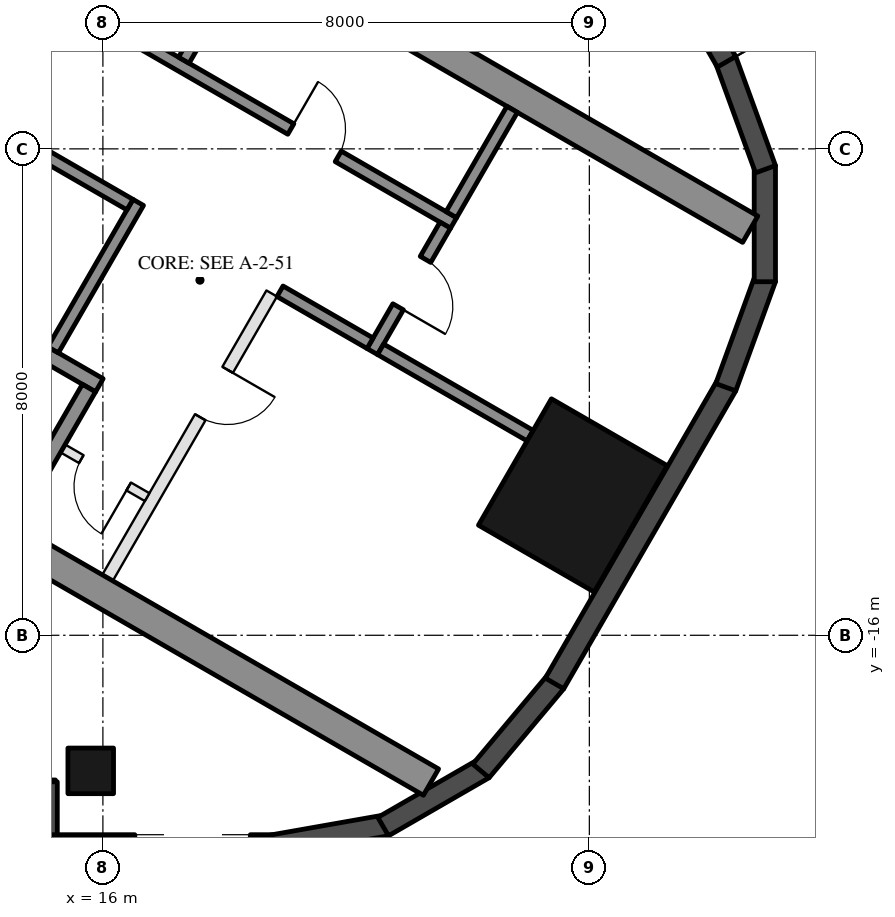
"""IFC4 building model, lengths in metres.
Left out: names, types, materials, properties, quantities, classifications, styles, units other than length and angle.
Written with IfcOpenShell. Run it as: python <this file> out.ifc"""

import sys

from ifc_helpers import new_model, si_unit, direction, frame, frame_2d, origin, origin_2d, place, context, subcontext, project, spatial, rectangle, hollow_rectangle, extrude, element, fill, save


model = new_model("IFC4")
c1 = context("Model", 3, precision=1e-05, world=origin(), true_north=direction((0.0, 1.0)))
c2 = subcontext(c1, "Body", "Model", "MODEL_VIEW")
j1 = project(units=[si_unit("LENGTHUNIT", "METRE"), si_unit("PLANEANGLEUNIT", "RADIAN")], contexts=[c1])
p1 = place(None, origin())
s1 = spatial("IfcSite", under=j1, at=p1, CompositionType="ELEMENT")
p2 = place(p1, origin())
s2 = spatial("IfcBuilding", under=s1, at=p2, CompositionType="ELEMENT")
p3 = place(p2, frame((0.0, 0.0, 220.6)))
s3 = spatial("IfcBuildingStorey", under=s2, at=p3, CompositionType="ELEMENT", Elevation=220.6)
p4 = place(p3, frame((15.8, -18.23, 0.0), z_axis=(0.0, 0.0, 1.0), x_axis=(-1.0, 0.0, 0.0)))
e1 = element("IfcColumn", 1, at=p4, inside=s3, PredefinedType="COLUMN", context=c2, shape_type="SweptSolid", body=[
    extrude(hollow_rectangle(XDim=0.75, YDim=0.75, WallThickness=0.035, at=origin_2d()), origin(), (0.0, 0.0, 1.0), 3.7),
])
p5 = place(p3, frame((23.729, -13.7, 0.0), z_axis=(0.0, 0.0, 1.0), x_axis=(0.5, 0.866025403784, 0.0)))
e2 = element("IfcColumn", 2, at=p5, inside=s3, PredefinedType="COLUMN", context=c2, shape_type="SweptSolid", body=[
    extrude(hollow_rectangle(XDim=2.4, YDim=2.2, WallThickness=0.06, at=origin_2d()), origin(), (0.0, 0.0, 1.0), 3.7),
])
p6 = place(p3, frame((8.48, -18.555, 0.0), z_axis=(0.0, 0.0, 1.0), x_axis=(1.0, 0.0, 0.0)))
e3 = element("IfcWall", 3, at=p6, inside=s3, PredefinedType="SOLIDWALL", context=c2, shape_type="SweptSolid", body=[
    extrude(rectangle(XDim=6.74, YDim=0.35, at=frame_2d((3.37, 0.0))), origin(), (0.0, 0.0, 1.0), 3.55),
])
p7 = place(p6, frame((0.32, 0.0, 0.0)))
e4 = element("IfcOpeningElement", 4, at=p7, cuts=e3, PredefinedType="OPENING", context=c2, shape_type="SweptSolid", body=[
    extrude(rectangle(XDim=2.4, YDim=2.4, at=frame_2d((1.2, 1.2))), frame((0.0, 0.185, 0.0), z_axis=(0.0, -1.0, 0.0), x_axis=(1.0, 0.0, 0.0)), (0.0, 0.0, 1.0), 0.37),
])
p8 = place(p6, frame((3.02, 0.0, 0.3)))
e5 = element("IfcOpeningElement", 5, at=p8, cuts=e3, PredefinedType="OPENING", context=c2, shape_type="SweptSolid", body=[
    extrude(rectangle(XDim=2.9, YDim=2.65, at=frame_2d((1.45, 1.325))), frame((0.0, 0.185, 0.0), z_axis=(0.0, -1.0, 0.0), x_axis=(1.0, 0.0, 0.0)), (0.0, 0.0, 1.0), 0.37),
])
p9 = place(p3, frame((15.075, -18.41, 0.0), z_axis=(0.0, 0.0, 1.0), x_axis=(0.0, -1.0, 0.0)))
e6 = element("IfcWall", 6, at=p9, inside=s3, PredefinedType="SOLIDWALL", context=c2, shape_type="SweptSolid", body=[
    extrude(rectangle(XDim=1.22, YDim=0.35, at=frame_2d((0.61, 0.0))), origin(), (0.0, 0.0, 1.0), 3.55),
])
p10 = place(p3, frame((14.9, -19.455, 0.0), z_axis=(0.0, 0.0, 1.0), x_axis=(1.0, 0.0, 0.0)))
e7 = element("IfcWall", 7, at=p10, inside=s3, PredefinedType="SOLIDWALL", context=c2, shape_type="SweptSolid", body=[
    extrude(rectangle(XDim=3.916, YDim=0.35, at=frame_2d((1.958, 0.0))), origin(), (0.0, 0.0, 1.0), 3.55),
])
p11 = place(p10, frame((1.625, 0.0, 0.3)))
e8 = element("IfcOpeningElement", 8, at=p11, cuts=e7, PredefinedType="OPENING", context=c2, shape_type="SweptSolid", body=[
    extrude(rectangle(XDim=1.9, YDim=2.65, at=frame_2d((0.95, 1.325))), frame((0.0, 0.185, 0.0), z_axis=(0.0, -1.0, 0.0), x_axis=(1.0, 0.0, 0.0)), (0.0, 0.0, 1.0), 0.37),
])
p12 = place(p3, frame((18.785, -19.458, 0.0), z_axis=(0.0, 0.0, 1.0), x_axis=(0.984798995425, 0.173697837091, 0.0)))
e9 = element("IfcWall", 9, at=p12, inside=s3, PredefinedType="SOLIDWALL", context=c2, shape_type="SweptSolid", body=[
    extrude(rectangle(XDim=1.91, YDim=0.35, at=frame_2d((0.955, 0.0))), origin(), (0.0, 0.0, 1.0), 3.55),
])
for number, where, z_axis, x_axis in (
    (10, (20.61, -19.147, 0.0), (0.0, 0.0, 1.0), (0.866, 0.5, 0.0)),
    (11, (22.217, -18.231, 0.0), (0.0, 0.0, 1.0), (0.643, 0.766, 0.0)),
):
    element("IfcWall", number, at=place(p3, frame(where, z_axis=z_axis, x_axis=x_axis)), inside=s3, PredefinedType="SOLIDWALL", context=c2, shape_type="SweptSolid", body=[
        extrude(rectangle(XDim=1.91, YDim=0.35, at=frame_2d((0.955, 0.0))), origin(), (0.0, 0.0, 1.0), 3.55),
    ])
p13 = place(p3, frame((23.427, -16.792, 0.0), z_axis=(0.0, 0.0, 1.0), x_axis=(0.500018773155, 0.866014564827, 0.0)))
e12 = element("IfcWall", 12, at=p13, inside=s3, PredefinedType="SOLIDWALL", context=c2, shape_type="SweptSolid", body=[
    extrude(rectangle(XDim=5.658, YDim=0.35, at=frame_2d((2.829, 0.0))), origin(), (0.0, 0.0, 1.0), 3.55),
])
for number, where, z_axis, x_axis in (
    (13, (26.244, -11.92, 0.0), (0.0, 0.0, 1.0), (0.342, 0.94, 0.0)),
    (14, (26.886, -10.185, 0.0), (0.0, 0.0, 1.0), (0.0, 1.0, 0.0)),
    (15, (26.897, -8.335, 0.0), (0.0, 0.0, 1.0), (-0.342, 0.94, 0.0)),
):
    element("IfcWall", number, at=place(p3, frame(where, z_axis=z_axis, x_axis=x_axis)), inside=s3, PredefinedType="SOLIDWALL", context=c2, shape_type="SweptSolid", body=[
        extrude(rectangle(XDim=1.91, YDim=0.35, at=frame_2d((0.955, 0.0))), origin(), (0.0, 0.0, 1.0), 3.55),
    ])
p14 = place(p3, frame((26.257, -6.567, 0.0), z_axis=(0.0, 0.0, 1.0), x_axis=(-0.500023526245, 0.866011820475, 0.0)))
e16 = element("IfcWall", 16, at=p14, inside=s3, PredefinedType="SOLIDWALL", context=c2, shape_type="SweptSolid", body=[
    extrude(rectangle(XDim=11.816, YDim=0.35, at=frame_2d((5.908, 0.0))), origin(), (0.0, 0.0, 1.0), 3.55),
])
p15 = place(p14, frame((0.38, 0.0, 0.3)))
e17 = element("IfcOpeningElement", 17, at=p15, cuts=e16, PredefinedType="OPENING", context=c2, shape_type="SweptSolid", body=[
    extrude(rectangle(XDim=1.9, YDim=2.65, at=frame_2d((0.95, 1.325))), frame((0.0, 0.185, 0.0), z_axis=(0.0, -1.0, 0.0), x_axis=(1.0, 0.0, 0.0)), (0.0, 0.0, 1.0), 0.37),
])
p16 = place(p14, frame((7.791, 0.0, 0.0)))
e18 = element("IfcOpeningElement", 18, at=p16, cuts=e16, PredefinedType="OPENING", context=c2, shape_type="SweptSolid", body=[
    extrude(rectangle(XDim=2.4, YDim=2.4, at=frame_2d((1.2, 1.2))), frame((0.0, 0.185, 0.0), z_axis=(0.0, -1.0, 0.0), x_axis=(1.0, 0.0, 0.0)), (0.0, 0.0, 1.0), 0.37),
])
p17 = place(p14, frame((3.741, 0.0, 0.3)))
e19 = element("IfcOpeningElement", 19, at=p17, cuts=e16, PredefinedType="OPENING", context=c2, shape_type="SweptSolid", body=[
    extrude(rectangle(XDim=1.7, YDim=2.65, at=frame_2d((0.85, 1.325))), frame((0.0, 0.185, 0.0), z_axis=(0.0, -1.0, 0.0), x_axis=(1.0, 0.0, 0.0)), (0.0, 0.0, 1.0), 0.37),
])
p18 = place(p14, frame((5.741, 0.0, 0.3)))
e20 = element("IfcOpeningElement", 20, at=p18, cuts=e16, PredefinedType="OPENING", context=c2, shape_type="SweptSolid", body=[
    extrude(rectangle(XDim=1.7, YDim=2.65, at=frame_2d((0.85, 1.325))), frame((0.0, 0.185, 0.0), z_axis=(0.0, -1.0, 0.0), x_axis=(1.0, 0.0, 0.0)), (0.0, 0.0, 1.0), 0.37),
])
for number, where, z_axis, x_axis in (
    (21, (8.547, -10.997, 0.0), (0.0, 0.0, 1.0), (0.866, -0.5, 0.0)),
    (22, (13.797, -1.903, 0.0), (0.0, 0.0, 1.0), (0.866, -0.5, 0.0)),
):
    element("IfcWall", number, at=place(p3, frame(where, z_axis=z_axis, x_axis=x_axis)), inside=s3, PredefinedType="SHEAR", context=c2, shape_type="SweptSolid", body=[
        extrude(rectangle(XDim=14.837, YDim=0.5, at=frame_2d((7.418, 0.0))), origin(), (0.0, 0.0, 1.0), 3.5),
    ])
p19 = place(p3, frame((10.356, -8.664, 0.0), z_axis=(0.0, 0.0, 1.0), x_axis=(0.866028629588, -0.499994412703, 0.0)))
e23 = element("IfcWall", 23, at=p19, inside=s3, PredefinedType="SHEAR", context=c2, shape_type="SweptSolid", body=[
    extrude(rectangle(XDim=6.45, YDim=0.25, at=frame_2d((3.225, 0.0))), origin(), (0.0, 0.0, 1.0), 3.5),
])
p20 = place(p19, frame((0.3, 0.0, 0.0)))
e24 = element("IfcOpeningElement", 24, at=p20, cuts=e23, PredefinedType="OPENING", context=c2, shape_type="SweptSolid", body=[
    extrude(rectangle(XDim=1.0, YDim=2.1, at=frame_2d((0.5, 1.05))), frame((0.0, 0.135, 0.0), z_axis=(0.0, -1.0, 0.0), x_axis=(1.0, 0.0, 0.0)), (0.0, 0.0, 1.0), 0.27),
])
p21 = place(p3, frame((14.496, -14.143, 0.0), z_axis=(0.0, 0.0, 1.0), x_axis=(0.500062241894, 0.865989465428, 0.0)))
e25 = element("IfcWall", 25, at=p21, inside=s3, PredefinedType="SHEAR", context=c2, shape_type="SweptSolid", body=[
    extrude(rectangle(XDim=2.55, YDim=0.25, at=frame_2d((1.275, 0.0))), origin(), (0.0, 0.0, 1.0), 3.5),
])
p22 = place(p3, frame((15.181, -11.305, 0.0), z_axis=(0.0, 0.0, 1.0), x_axis=(0.49994636267, 0.866056369097, 0.0)))
e26 = element("IfcWall", 26, at=p22, inside=s3, PredefinedType="SHEAR", context=c2, shape_type="SweptSolid", body=[
    extrude(rectangle(XDim=2.8, YDim=0.2, at=frame_2d((1.4, 0.0))), origin(), (0.0, 0.0, 1.0), 3.5),
])
p23 = place(p3, frame((14.02, -7.517, 0.0), z_axis=(0.0, 0.0, 1.0), x_axis=(0.866034573852, -0.49998411664, 0.0)))
e27 = element("IfcWall", 27, at=p23, inside=s3, PredefinedType="SHEAR", context=c2, shape_type="SweptSolid", body=[
    extrude(rectangle(XDim=2.8, YDim=0.2, at=frame_2d((1.4, 0.0))), origin(), (0.0, 0.0, 1.0), 3.5),
])
p24 = place(p3, frame((12.968, -4.138, 0.0), z_axis=(0.0, 0.0, 1.0), x_axis=(0.866028328073, -0.49999493495, 0.0)))
e28 = element("IfcWall", 28, at=p24, inside=s3, PredefinedType="SHEAR", context=c2, shape_type="SweptSolid", body=[
    extrude(rectangle(XDim=10.16, YDim=0.2, at=frame_2d((5.08, 0.0))), origin(), (0.0, 0.0, 1.0), 3.5),
])
p25 = place(p24, frame((1.99, 0.0, 0.0)))
e29 = element("IfcOpeningElement", 29, at=p25, cuts=e28, PredefinedType="OPENING", context=c2, shape_type="SweptSolid", body=[
    extrude(rectangle(XDim=0.9, YDim=2.1, at=frame_2d((0.45, 1.05))), frame((0.0, 0.11, 0.0), z_axis=(0.0, -1.0, 0.0), x_axis=(1.0, 0.0, 0.0)), (0.0, 0.0, 1.0), 0.22),
])
p26 = place(p24, frame((7.07, 0.0, 0.0)))
e30 = element("IfcOpeningElement", 30, at=p26, cuts=e28, PredefinedType="OPENING", context=c2, shape_type="SweptSolid", body=[
    extrude(rectangle(XDim=0.9, YDim=2.1, at=frame_2d((0.45, 1.05))), frame((0.0, 0.11, 0.0), z_axis=(0.0, -1.0, 0.0), x_axis=(1.0, 0.0, 0.0)), (0.0, 0.0, 1.0), 0.22),
])
p27 = place(p3, frame((20.43, -11.333, 0.0), z_axis=(0.0, 0.0, 1.0), x_axis=(0.500001309137, 0.866024647952, 0.0)))
e31 = element("IfcWall", 31, at=p27, inside=s3, PredefinedType="SHEAR", context=c2, shape_type="SweptSolid", body=[
    extrude(rectangle(XDim=2.4, YDim=0.2, at=frame_2d((1.2, 0.0))), origin(), (0.0, 0.0, 1.0), 3.5),
])
p28 = place(p27, frame((0.85, 0.0, 0.0)))
e32 = element("IfcOpeningElement", 32, at=p28, cuts=e31, PredefinedType="OPENING", context=c2, shape_type="SweptSolid", body=[
    extrude(rectangle(XDim=0.9, YDim=2.1, at=frame_2d((0.45, 1.05))), frame((0.0, 0.11, 0.0), z_axis=(0.0, -1.0, 0.0), x_axis=(1.0, 0.0, 0.0)), (0.0, 0.0, 1.0), 0.22),
])
p29 = place(p3, frame((18.913, -10.342, 0.0), z_axis=(0.0, 0.0, 1.0), x_axis=(0.866038183914, -0.499977863513, 0.0)))
e33 = element("IfcWall", 33, at=p29, inside=s3, PredefinedType="SHEAR", context=c2, shape_type="SweptSolid", body=[
    extrude(rectangle(XDim=1.71, YDim=0.2, at=frame_2d((0.855, 0.0))), origin(), (0.0, 0.0, 1.0), 3.5),
])
for number, where, z_axis, x_axis in (
    (34, (17.331, -6.542, 0.0), (0.0, 0.0, 1.0), (0.5, 0.866, 0.0)),
    (35, (21.73, -9.082, 0.0), (0.0, 0.0, 1.0), (0.5, 0.866, 0.0)),
):
    element("IfcWall", number, at=place(p3, frame(where, z_axis=z_axis, x_axis=x_axis)), inside=s3, PredefinedType="SHEAR", context=c2, shape_type="SweptSolid", body=[
        extrude(rectangle(XDim=2.0, YDim=0.2, at=frame_2d((1.0, 0.0))), origin(), (0.0, 0.0, 1.0), 3.5),
    ])
p30 = place(p3, frame((20.567, -11.297, 0.0), z_axis=(0.0, 0.0, 1.0), x_axis=(0.866055327414, -0.49994816717, 0.0)))
e36 = element("IfcWall", 36, at=p30, inside=s3, PredefinedType="SHEAR", context=c2, shape_type="SweptSolid", body=[
    extrude(rectangle(XDim=2.84, YDim=0.2, at=frame_2d((1.42, 0.0))), origin(), (0.0, 0.0, 1.0), 3.5),
])
p31 = place(p3, frame((16.076, -15.055, 0.0), z_axis=(0.0, 0.0, 1.0), x_axis=(0.499995103361, 0.866028230842, 0.0)))
e37 = element("IfcWall", 37, at=p31, inside=s3, PredefinedType="PARTITIONING", context=c2, shape_type="SweptSolid", body=[
    extrude(rectangle(XDim=5.4, YDim=0.2, at=frame_2d((2.7, 0.0))), origin(), (0.0, 0.0, 1.0), 3.5),
])
p32 = place(p31, frame((3.05, 0.0, 0.0)))
e38 = element("IfcOpeningElement", 38, at=p32, cuts=e37, PredefinedType="OPENING", context=c2, shape_type="SweptSolid", body=[
    extrude(rectangle(XDim=0.9, YDim=2.1, at=frame_2d((0.45, 1.05))), frame((0.0, 0.11, 0.0), z_axis=(0.0, -1.0, 0.0), x_axis=(1.0, 0.0, 0.0)), (0.0, 0.0, 1.0), 0.22),
])
p33 = place(p3, frame((15.342, -12.928, 0.0), z_axis=(0.0, 0.0, 1.0), x_axis=(0.865989903783, -0.500061482766, 0.0)))
e39 = element("IfcWall", 39, at=p33, inside=s3, PredefinedType="PARTITIONING", context=c2, shape_type="SweptSolid", body=[
    extrude(rectangle(XDim=1.6, YDim=0.15, at=frame_2d((0.8, 0.0))), origin(), (0.0, 0.0, 1.0), 3.5),
])
p34 = place(p33, frame((0.35, 0.0, 0.0)))
e40 = element("IfcOpeningElement", 40, at=p34, cuts=e39, PredefinedType="OPENING", context=c2, shape_type="SweptSolid", body=[
    extrude(rectangle(XDim=0.9, YDim=2.1, at=frame_2d((0.45, 1.05))), frame((0.0, 0.085, 0.0), z_axis=(0.0, -1.0, 0.0), x_axis=(1.0, 0.0, 0.0)), (0.0, 0.0, 1.0), 0.17),
])
p35 = place(p34, frame((0.9, 0.0, 0.0), z_axis=(0.0, 0.0, 1.0), x_axis=(-1.0, 0.0, 0.0)))
e41 = element("IfcDoor", 41, at=p35, inside=s3, OperationType="SINGLE_SWING_LEFT", PredefinedType="DOOR", context=c2, shape_type="SweptSolid", body=[
    extrude(rectangle(XDim=0.9, YDim=2.1, at=frame_2d((0.45, 1.05))), frame((0.0, 0.025, 0.0), z_axis=(0.0, -1.0, 0.0), x_axis=(1.0, 0.0, 0.0)), (0.0, 0.0, 1.0), 0.05),
])
fill(e40, e41)
p36 = place(p26, origin())
e42 = element("IfcDoor", 42, at=p36, inside=s3, OperationType="SINGLE_SWING_LEFT", PredefinedType="DOOR", context=c2, shape_type="SweptSolid", body=[
    extrude(rectangle(XDim=0.9, YDim=2.1, at=frame_2d((0.45, 1.05))), frame((0.0, 0.025, 0.0), z_axis=(0.0, -1.0, 0.0), x_axis=(1.0, 0.0, 0.0)), (0.0, 0.0, 1.0), 0.05),
])
fill(e30, e42)
p37 = place(p28, frame((0.9, 0.0, 0.0), z_axis=(0.0, 0.0, 1.0), x_axis=(-1.0, 0.0, 0.0)))
e43 = element("IfcDoor", 43, at=p37, inside=s3, OperationType="SINGLE_SWING_RIGHT", PredefinedType="DOOR", context=c2, shape_type="SweptSolid", body=[
    extrude(rectangle(XDim=0.9, YDim=2.1, at=frame_2d((0.45, 1.05))), frame((0.0, 0.025, 0.0), z_axis=(0.0, -1.0, 0.0), x_axis=(1.0, 0.0, 0.0)), (0.0, 0.0, 1.0), 0.05),
])
fill(e32, e43)
p38 = place(p32, frame((0.9, 0.0, 0.0), z_axis=(0.0, 0.0, 1.0), x_axis=(-1.0, 0.0, 0.0)))
e44 = element("IfcDoor", 44, at=p38, inside=s3, OperationType="SINGLE_SWING_LEFT", PredefinedType="DOOR", context=c2, shape_type="SweptSolid", body=[
    extrude(rectangle(XDim=0.9, YDim=2.1, at=frame_2d((0.45, 1.05))), frame((0.0, 0.025, 0.0), z_axis=(0.0, -1.0, 0.0), x_axis=(1.0, 0.0, 0.0)), (0.0, 0.0, 1.0), 0.05),
])
fill(e38, e44)
save(model, sys.argv[1])
